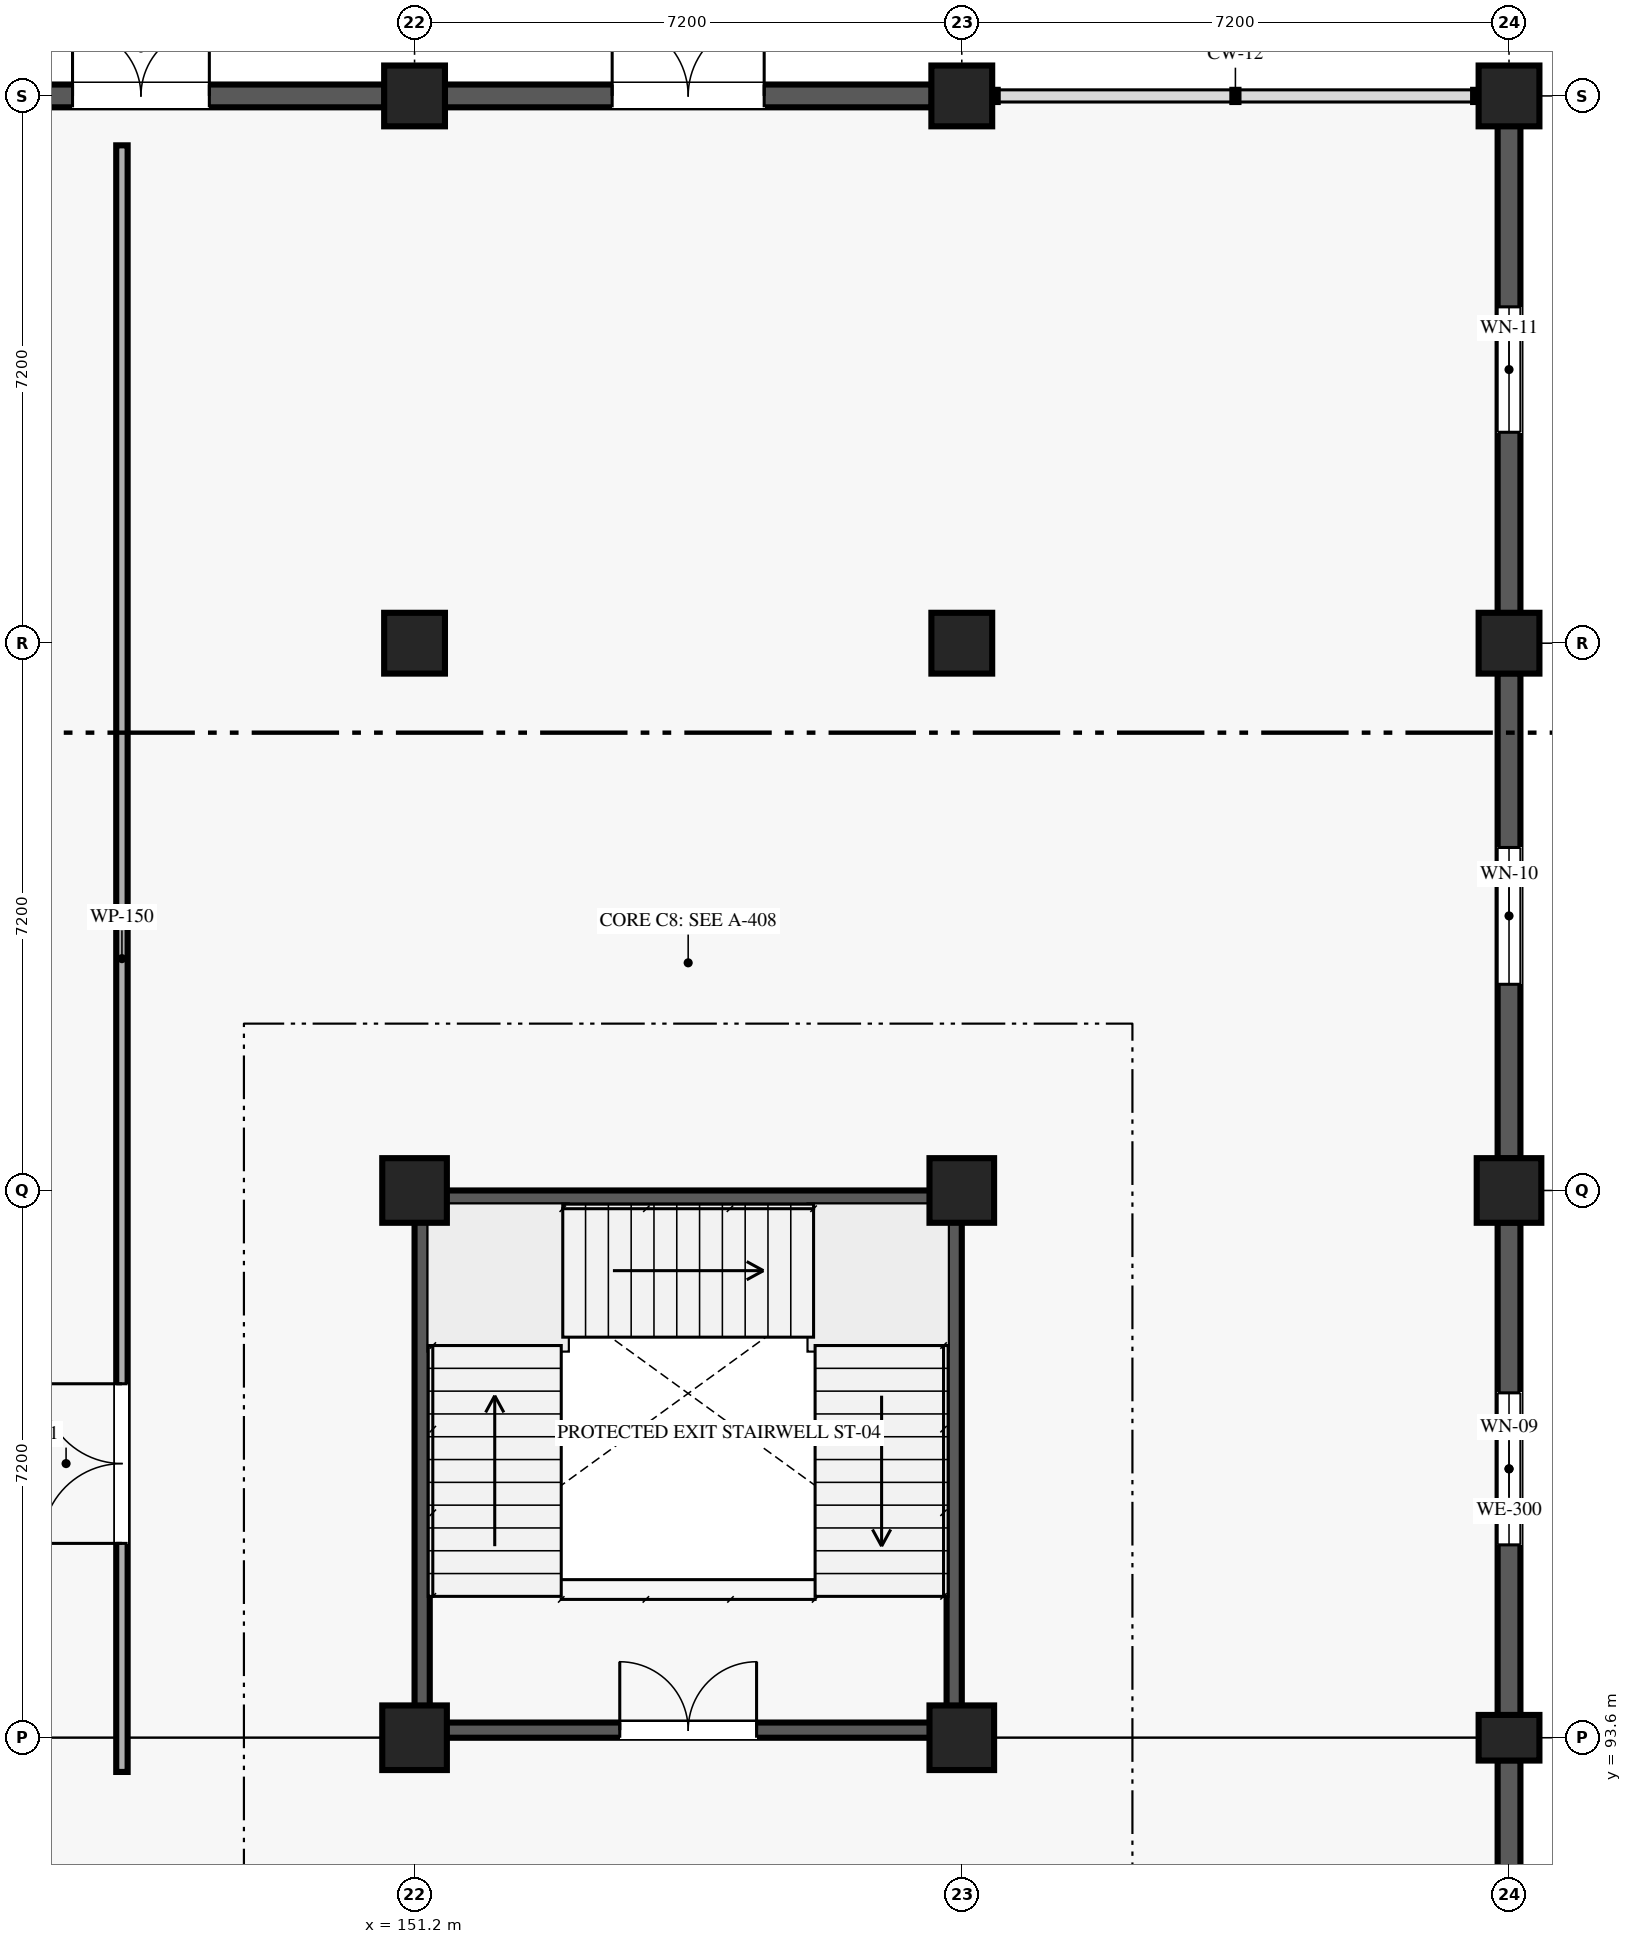
"""IFC4 building model, lengths in metres.
Left out: names, types, materials, properties, quantities, classifications, styles, units other than length and angle.
Written with IfcOpenShell. Run it as: python <this file> out.ifc"""

import sys

from ifc_helpers import new_model, si_unit, direction, frame, frame_2d, origin, origin_2d, place, context, subcontext, project, spatial, rectangle, extrude, element, fill, save


model = new_model("IFC4")
c1 = context("Model", 3, precision=1e-05, world=origin(), true_north=direction((0.0, 1.0)))
c2 = subcontext(c1, "Body", "Model", "MODEL_VIEW")
j1 = project(units=[si_unit("LENGTHUNIT", "METRE"), si_unit("PLANEANGLEUNIT", "RADIAN")], contexts=[c1])
p1 = place(None, origin())
s1 = spatial("IfcSite", under=j1, at=p1, CompositionType="ELEMENT")
p2 = place(p1, origin())
s2 = spatial("IfcBuilding", under=s1, at=p2, CompositionType="ELEMENT")
p3 = place(p2, origin())
s3 = spatial("IfcBuildingStorey", under=s2, at=p3, CompositionType="ELEMENT", Elevation=0.0)
for number, where, z_axis, x_axis in (
    (1, (151.2, 93.6, 0.0), (0.0, 0.0, 1.0), (1.0, 0.0, 0.0)),
    (2, (151.2, 100.8, 0.0), (0.0, 0.0, 1.0), (1.0, 0.0, 0.0)),
):
    element("IfcColumn", number, at=place(p3, frame(where, z_axis=z_axis, x_axis=x_axis)), inside=s3, PredefinedType="COLUMN", context=c2, shape_type="SweptSolid", body=[
        extrude(rectangle(XDim=0.85, YDim=0.85, at=origin_2d()), origin(), (0.0, 0.0, 1.0), 5.4),
    ])
for number, where, z_axis, x_axis in (
    (3, (151.2, 108.0, 0.0), (0.0, 0.0, 1.0), (1.0, 0.0, 0.0)),
    (4, (151.2, 115.2, 0.0), (0.0, 0.0, 1.0), (1.0, 0.0, 0.0)),
):
    element("IfcColumn", number, at=place(p3, frame(where, z_axis=z_axis, x_axis=x_axis)), inside=s3, PredefinedType="COLUMN", context=c2, shape_type="SweptSolid", body=[
        extrude(rectangle(XDim=0.8, YDim=0.8, at=origin_2d()), origin(), (0.0, 0.0, 1.0), 5.4),
    ])
for number, where, z_axis, x_axis in (
    (5, (158.4, 93.6, 0.0), (0.0, 0.0, 1.0), (1.0, 0.0, 0.0)),
    (6, (158.4, 100.8, 0.0), (0.0, 0.0, 1.0), (1.0, 0.0, 0.0)),
):
    element("IfcColumn", number, at=place(p3, frame(where, z_axis=z_axis, x_axis=x_axis)), inside=s3, PredefinedType="COLUMN", context=c2, shape_type="SweptSolid", body=[
        extrude(rectangle(XDim=0.85, YDim=0.85, at=origin_2d()), origin(), (0.0, 0.0, 1.0), 5.4),
    ])
for number, where, z_axis, x_axis in (
    (7, (158.4, 108.0, 0.0), (0.0, 0.0, 1.0), (1.0, 0.0, 0.0)),
    (8, (158.4, 115.2, 0.0), (0.0, 0.0, 1.0), (1.0, 0.0, 0.0)),
):
    element("IfcColumn", number, at=place(p3, frame(where, z_axis=z_axis, x_axis=x_axis)), inside=s3, PredefinedType="COLUMN", context=c2, shape_type="SweptSolid", body=[
        extrude(rectangle(XDim=0.8, YDim=0.8, at=origin_2d()), origin(), (0.0, 0.0, 1.0), 5.4),
    ])
p4 = place(p3, frame((165.6, 93.6, 0.0), z_axis=(0.0, 0.0, 1.0), x_axis=(0.0, 1.0, 0.0)))
e9 = element("IfcColumn", 9, at=p4, inside=s3, PredefinedType="COLUMN", context=c2, shape_type="SweptSolid", body=[
    extrude(rectangle(XDim=0.6, YDim=0.8, at=origin_2d()), origin(), (0.0, 0.0, 1.0), 5.4),
])
p5 = place(p3, frame((165.6, 100.8, 0.0), z_axis=(0.0, 0.0, 1.0), x_axis=(1.0, 0.0, 0.0)))
e10 = element("IfcColumn", 10, at=p5, inside=s3, PredefinedType="COLUMN", context=c2, shape_type="SweptSolid", body=[
    extrude(rectangle(XDim=0.85, YDim=0.85, at=origin_2d()), origin(), (0.0, 0.0, 1.0), 5.4),
])
for number, where, z_axis, x_axis in (
    (11, (165.6, 108.0, 0.0), (0.0, 0.0, 1.0), (1.0, 0.0, 0.0)),
    (12, (165.6, 115.2, 0.0), (0.0, 0.0, 1.0), (1.0, 0.0, 0.0)),
):
    element("IfcColumn", number, at=place(p3, frame(where, z_axis=z_axis, x_axis=x_axis)), inside=s3, PredefinedType="COLUMN", context=c2, shape_type="SweptSolid", body=[
        extrude(rectangle(XDim=0.8, YDim=0.8, at=origin_2d()), origin(), (0.0, 0.0, 1.0), 5.4),
    ])
p6 = place(p3, frame((144.395, 115.2, 0.0), z_axis=(0.0, 0.0, 1.0), x_axis=(1.0, 0.0, 0.0)))
e13 = element("IfcWall", 13, at=p6, inside=s3, PredefinedType="SOLIDWALL", context=c2, shape_type="SweptSolid", body=[
    extrude(rectangle(XDim=6.41, YDim=0.3, at=frame_2d((3.205, 0.0))), origin(), (0.0, 0.0, 1.0), 5.16),
])
p7 = place(p6, frame((2.305, 0.0, 0.0)))
e14 = element("IfcOpeningElement", 14, at=p7, cuts=e13, PredefinedType="OPENING", context=c2, shape_type="SweptSolid", body=[
    extrude(rectangle(XDim=1.8, YDim=2.2, at=frame_2d((0.9, 1.1))), frame((0.0, 0.16, 0.0), z_axis=(0.0, -1.0, 0.0), x_axis=(1.0, 0.0, 0.0)), (0.0, 0.0, 1.0), 0.32),
])
p8 = place(p3, frame((151.595, 115.2, 0.0), z_axis=(0.0, 0.0, 1.0), x_axis=(1.0, 0.0, 0.0)))
e15 = element("IfcWall", 15, at=p8, inside=s3, PredefinedType="SOLIDWALL", context=c2, shape_type="SweptSolid", body=[
    extrude(rectangle(XDim=6.41, YDim=0.3, at=frame_2d((3.205, 0.0))), origin(), (0.0, 0.0, 1.0), 5.16),
])
p9 = place(p8, frame((2.205, 0.0, 0.0)))
e16 = element("IfcOpeningElement", 16, at=p9, cuts=e15, PredefinedType="OPENING", context=c2, shape_type="SweptSolid", body=[
    extrude(rectangle(XDim=2.0, YDim=2.3, at=frame_2d((1.0, 1.15))), frame((0.0, 0.16, 0.0), z_axis=(0.0, -1.0, 0.0), x_axis=(1.0, 0.0, 0.0)), (0.0, 0.0, 1.0), 0.32),
])
p10 = place(p3, frame((165.6, 93.305, 0.0), z_axis=(0.0, 0.0, 1.0), x_axis=(0.0, -1.0, 0.0)))
e17 = element("IfcWall", 17, at=p10, inside=s3, PredefinedType="SOLIDWALL", context=c2, shape_type="SweptSolid", body=[
    extrude(rectangle(XDim=6.61, YDim=0.3, at=frame_2d((3.305, 0.0))), origin(), (0.0, 0.0, 1.0), 5.16),
])
p11 = place(p10, frame((2.105, 0.0, 0.0)))
e18 = element("IfcOpeningElement", 18, at=p11, cuts=e17, PredefinedType="OPENING", context=c2, shape_type="SweptSolid", body=[
    extrude(rectangle(XDim=2.4, YDim=2.6, at=frame_2d((1.2, 1.3))), frame((0.0, 0.16, 0.0), z_axis=(0.0, -1.0, 0.0), x_axis=(1.0, 0.0, 0.0)), (0.0, 0.0, 1.0), 0.32),
])
p12 = place(p3, frame((165.6, 93.895, 0.0), z_axis=(0.0, 0.0, 1.0), x_axis=(0.0, 1.0, 0.0)))
e19 = element("IfcWall", 19, at=p12, inside=s3, PredefinedType="SOLIDWALL", context=c2, shape_type="SweptSolid", body=[
    extrude(rectangle(XDim=6.485, YDim=0.3, at=frame_2d((3.242, 0.0))), origin(), (0.0, 0.0, 1.0), 5.16),
])
p13 = place(p12, frame((2.242, 0.0, 0.85)))
e20 = element("IfcOpeningElement", 20, at=p13, cuts=e19, PredefinedType="OPENING", context=c2, shape_type="SweptSolid", body=[
    extrude(rectangle(XDim=2.0, YDim=1.65, at=frame_2d((1.0, 0.825))), frame((0.0, 0.16, 0.0), z_axis=(0.0, -1.0, 0.0), x_axis=(1.0, 0.0, 0.0)), (0.0, 0.0, 1.0), 0.32),
])
p14 = place(p3, frame((165.6, 101.22, 0.0), z_axis=(0.0, 0.0, 1.0), x_axis=(0.0, 1.0, 0.0)))
e21 = element("IfcWall", 21, at=p14, inside=s3, PredefinedType="SOLIDWALL", context=c2, shape_type="SweptSolid", body=[
    extrude(rectangle(XDim=6.385, YDim=0.3, at=frame_2d((3.192, 0.0))), origin(), (0.0, 0.0, 1.0), 5.16),
])
p15 = place(p14, frame((2.292, 0.0, 0.85)))
e22 = element("IfcOpeningElement", 22, at=p15, cuts=e21, PredefinedType="OPENING", context=c2, shape_type="SweptSolid", body=[
    extrude(rectangle(XDim=1.8, YDim=1.6, at=frame_2d((0.9, 0.8))), frame((0.0, 0.16, 0.0), z_axis=(0.0, -1.0, 0.0), x_axis=(1.0, 0.0, 0.0)), (0.0, 0.0, 1.0), 0.32),
])
p16 = place(p3, frame((165.6, 108.395, 0.0), z_axis=(0.0, 0.0, 1.0), x_axis=(0.0, 1.0, 0.0)))
e23 = element("IfcWall", 23, at=p16, inside=s3, PredefinedType="SOLIDWALL", context=c2, shape_type="SweptSolid", body=[
    extrude(rectangle(XDim=6.41, YDim=0.3, at=frame_2d((3.205, 0.0))), origin(), (0.0, 0.0, 1.0), 5.16),
])
p17 = place(p16, frame((2.38, 0.0, 0.85)))
e24 = element("IfcOpeningElement", 24, at=p17, cuts=e23, PredefinedType="OPENING", context=c2, shape_type="SweptSolid", body=[
    extrude(rectangle(XDim=1.65, YDim=1.55, at=frame_2d((0.825, 0.775))), frame((0.0, 0.16, 0.0), z_axis=(0.0, -1.0, 0.0), x_axis=(1.0, 0.0, 0.0)), (0.0, 0.0, 1.0), 0.32),
])
p18 = place(p3, frame((151.4, 93.7, 0.0), z_axis=(0.0, 0.0, 1.0), x_axis=(1.0, 0.0, 0.0)))
e25 = element("IfcWall", 25, at=p18, inside=s3, PredefinedType="SHEAR", context=c2, shape_type="SweptSolid", body=[
    extrude(rectangle(XDim=6.8, YDim=0.2, at=frame_2d((3.4, 0.0))), origin(), (0.0, 0.0, 1.0), 5.16),
])
p19 = place(p18, frame((2.5, 0.0, 0.0)))
e26 = element("IfcOpeningElement", 26, at=p19, cuts=e25, PredefinedType="OPENING", context=c2, shape_type="SweptSolid", body=[
    extrude(rectangle(XDim=1.8, YDim=2.2, at=frame_2d((0.9, 1.1))), frame((0.0, 0.11, 0.0), z_axis=(0.0, -1.0, 0.0), x_axis=(1.0, 0.0, 0.0)), (0.0, 0.0, 1.0), 0.22),
])
for number, where, z_axis, x_axis in (
    (27, (151.4, 100.7, 0.0), (0.0, 0.0, 1.0), (1.0, 0.0, 0.0)),
    (28, (151.3, 93.8, 0.0), (0.0, 0.0, 1.0), (0.0, 1.0, 0.0)),
    (29, (158.3, 93.8, 0.0), (0.0, 0.0, 1.0), (0.0, 1.0, 0.0)),
):
    element("IfcWall", number, at=place(p3, frame(where, z_axis=z_axis, x_axis=x_axis)), inside=s3, PredefinedType="SHEAR", context=c2, shape_type="SweptSolid", body=[
        extrude(rectangle(XDim=6.8, YDim=0.2, at=frame_2d((3.4, 0.0))), origin(), (0.0, 0.0, 1.0), 5.16),
    ])
p20 = place(p3, frame((147.35, 93.15, 0.0), z_axis=(0.0, 0.0, 1.0), x_axis=(0.0, 1.0, 0.0)))
e30 = element("IfcWall", 30, at=p20, inside=s3, PredefinedType="PARTITIONING", context=c2, shape_type="SweptSolid", body=[
    extrude(rectangle(XDim=21.4, YDim=0.15, at=frame_2d((10.7, 0.0))), origin(), (0.0, 0.0, 1.0), 5.16),
])
p21 = place(p20, frame((3.007, 0.0, 0.0)))
e31 = element("IfcOpeningElement", 31, at=p21, cuts=e30, PredefinedType="OPENING", context=c2, shape_type="SweptSolid", body=[
    extrude(rectangle(XDim=2.1, YDim=2.4, at=frame_2d((1.05, 1.2))), frame((0.0, 0.085, 0.0), z_axis=(0.0, -1.0, 0.0), x_axis=(1.0, 0.0, 0.0)), (0.0, 0.0, 1.0), 0.17),
])
p22 = place(p7, origin())
e32 = element("IfcDoor", 32, at=p22, inside=s3, OperationType="DOUBLE_DOOR_SINGLE_SWING", PredefinedType="DOOR", context=c2, shape_type="SweptSolid", body=[
    extrude(rectangle(XDim=1.8, YDim=2.2, at=frame_2d((0.9, 1.1))), frame((0.0, 0.025, 0.0), z_axis=(0.0, -1.0, 0.0), x_axis=(1.0, 0.0, 0.0)), (0.0, 0.0, 1.0), 0.05),
])
fill(e14, e32)
p23 = place(p9, origin())
e33 = element("IfcDoor", 33, at=p23, inside=s3, OperationType="DOUBLE_DOOR_SINGLE_SWING", PredefinedType="DOOR", context=c2, shape_type="SweptSolid", body=[
    extrude(rectangle(XDim=2.0, YDim=2.3, at=frame_2d((1.0, 1.15))), frame((0.0, 0.025, 0.0), z_axis=(0.0, -1.0, 0.0), x_axis=(1.0, 0.0, 0.0)), (0.0, 0.0, 1.0), 0.05),
])
fill(e16, e33)
p24 = place(p13, origin())
e34 = element("IfcWindow", 34, at=p24, inside=s3, PartitioningType="SINGLE_PANEL", PredefinedType="WINDOW", context=c2, shape_type="SweptSolid", body=[
    extrude(rectangle(XDim=2.0, YDim=1.65, at=frame_2d((1.0, 0.825))), frame((0.0, 0.03, 0.0), z_axis=(0.0, -1.0, 0.0), x_axis=(1.0, 0.0, 0.0)), (0.0, 0.0, 1.0), 0.06),
])
fill(e20, e34)
p25 = place(p15, origin())
e35 = element("IfcWindow", 35, at=p25, inside=s3, PartitioningType="SINGLE_PANEL", PredefinedType="WINDOW", context=c2, shape_type="SweptSolid", body=[
    extrude(rectangle(XDim=1.8, YDim=1.6, at=frame_2d((0.9, 0.8))), frame((0.0, 0.03, 0.0), z_axis=(0.0, -1.0, 0.0), x_axis=(1.0, 0.0, 0.0)), (0.0, 0.0, 1.0), 0.06),
])
fill(e22, e35)
p26 = place(p17, origin())
e36 = element("IfcWindow", 36, at=p26, inside=s3, PartitioningType="SINGLE_PANEL", PredefinedType="WINDOW", context=c2, shape_type="SweptSolid", body=[
    extrude(rectangle(XDim=1.65, YDim=1.55, at=frame_2d((0.825, 0.775))), frame((0.0, 0.03, 0.0), z_axis=(0.0, -1.0, 0.0), x_axis=(1.0, 0.0, 0.0)), (0.0, 0.0, 1.0), 0.06),
])
fill(e24, e36)
p27 = place(p19, origin())
e37 = element("IfcDoor", 37, at=p27, inside=s3, OperationType="DOUBLE_DOOR_SINGLE_SWING", PredefinedType="DOOR", context=c2, shape_type="SweptSolid", body=[
    extrude(rectangle(XDim=1.8, YDim=2.2, at=frame_2d((0.9, 1.1))), frame((0.0, 0.025, 0.0), z_axis=(0.0, -1.0, 0.0), x_axis=(1.0, 0.0, 0.0)), (0.0, 0.0, 1.0), 0.05),
])
fill(e26, e37)
p28 = place(p21, origin())
e38 = element("IfcDoor", 38, at=p28, inside=s3, OperationType="DOUBLE_DOOR_SINGLE_SWING", PredefinedType="DOOR", context=c2, shape_type="SweptSolid", body=[
    extrude(rectangle(XDim=2.1, YDim=2.4, at=frame_2d((1.05, 1.2))), frame((0.0, 0.025, 0.0), z_axis=(0.0, -1.0, 0.0), x_axis=(1.0, 0.0, 0.0)), (0.0, 0.0, 1.0), 0.05),
])
fill(e31, e38)
save(model, sys.argv[1])
